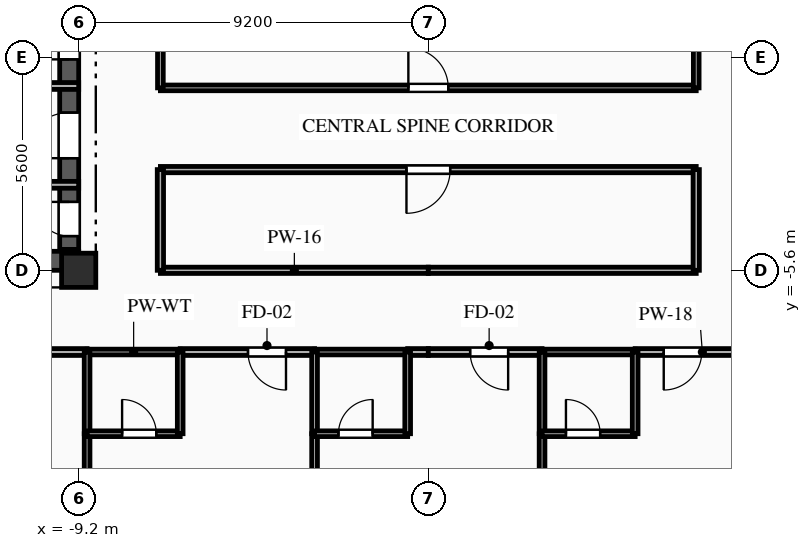
"""IFC4 building model, lengths in metres.
Left out: names, types, materials, properties, quantities, classifications, styles, units other than length and angle.
Written with IfcOpenShell. Run it as: python <this file> out.ifc"""

import sys

from ifc_helpers import new_model, si_unit, direction, frame, frame_2d, origin, origin_2d, place, context, subcontext, project, spatial, rectangle, extrude, element, fill, save


model = new_model("IFC4")
c1 = context("Model", 3, precision=1e-05, world=origin(), true_north=direction((0.0, 1.0)))
c2 = subcontext(c1, "Body", "Model", "MODEL_VIEW")
j1 = project(units=[si_unit("LENGTHUNIT", "METRE"), si_unit("PLANEANGLEUNIT", "RADIAN")], contexts=[c1])
p1 = place(None, origin())
s1 = spatial("IfcSite", under=j1, at=p1, CompositionType="ELEMENT")
p2 = place(p1, origin())
s2 = spatial("IfcBuilding", under=s1, at=p2, CompositionType="ELEMENT")
p3 = place(p2, frame((0.0, 0.0, 154.45)))
s3 = spatial("IfcBuildingStorey", under=s2, at=p3, CompositionType="ELEMENT", Elevation=154.45)
p4 = place(p3, frame((-9.2, -5.6, 0.0), z_axis=(0.0, 0.0, 1.0), x_axis=(1.0, 0.0, 0.0)))
e1 = element("IfcColumn", 1, at=p4, inside=s3, PredefinedType="COLUMN", context=c2, shape_type="SweptSolid", body=[
    extrude(rectangle(XDim=0.9, YDim=0.9, at=origin_2d()), origin(), (0.0, 0.0, 1.0), 3.35),
])
p5 = place(p3, frame((-18.8, -5.35, 0.0), z_axis=(0.0, 0.0, 1.0), x_axis=(1.0, 0.0, 0.0)))
e2 = element("IfcWall", 2, at=p5, inside=s3, PredefinedType="SHEAR", context=c2, shape_type="SweptSolid", body=[
    extrude(rectangle(XDim=9.6, YDim=0.5, at=frame_2d((4.8, 0.0))), origin(), (0.0, 0.0, 1.0), 3.04),
])
p6 = place(p5, frame((1.05, 0.0, 0.0)))
e3 = element("IfcOpeningElement", 3, at=p6, cuts=e2, PredefinedType="OPENING", context=c2, shape_type="SweptSolid", body=[
    extrude(rectangle(XDim=0.9, YDim=2.1, at=frame_2d((0.45, 1.05))), frame((0.0, 0.26, 0.0), z_axis=(0.0, -1.0, 0.0), x_axis=(1.0, 0.0, 0.0)), (0.0, 0.0, 1.0), 0.52),
])
p7 = place(p3, frame((-9.45, -5.05, 0.0), z_axis=(0.0, 0.0, 1.0), x_axis=(0.0, 1.0, 0.0)))
e4 = element("IfcWall", 4, at=p7, inside=s3, PredefinedType="SHEAR", context=c2, shape_type="SweptSolid", body=[
    extrude(rectangle(XDim=10.1, YDim=0.5, at=frame_2d((5.05, 0.0))), origin(), (0.0, 0.0, 1.0), 3.04),
])
p8 = place(p7, frame((7.15, 0.0, 0.0)))
e5 = element("IfcOpeningElement", 5, at=p8, cuts=e4, PredefinedType="OPENING", context=c2, shape_type="SweptSolid", body=[
    extrude(rectangle(XDim=0.9, YDim=2.1, at=frame_2d((0.45, 1.05))), frame((0.0, 0.26, 0.0), z_axis=(0.0, -1.0, 0.0), x_axis=(1.0, 0.0, 0.0)), (0.0, 0.0, 1.0), 0.52),
])
p9 = place(p7, frame((2.4, 0.0, 0.0)))
e6 = element("IfcOpeningElement", 6, at=p9, cuts=e4, PredefinedType="OPENING", context=c2, shape_type="SweptSolid", body=[
    extrude(rectangle(XDim=1.2, YDim=2.15, at=frame_2d((0.6, 1.075))), frame((0.0, 0.26, 0.0), z_axis=(0.0, -1.0, 0.0), x_axis=(1.0, 0.0, 0.0)), (0.0, 0.0, 1.0), 0.52),
])
p10 = place(p7, frame((0.35, 0.0, 0.0)))
e7 = element("IfcOpeningElement", 7, at=p10, cuts=e4, PredefinedType="OPENING", context=c2, shape_type="SweptSolid", body=[
    extrude(rectangle(XDim=0.9, YDim=2.1, at=frame_2d((0.45, 1.05))), frame((0.0, 0.26, 0.0), z_axis=(0.0, -1.0, 0.0), x_axis=(1.0, 0.0, 0.0)), (0.0, 0.0, 1.0), 0.52),
])
p11 = place(p7, frame((5.0, 0.0, 0.0)))
e8 = element("IfcOpeningElement", 8, at=p11, cuts=e4, PredefinedType="OPENING", context=c2, shape_type="SweptSolid", body=[
    extrude(rectangle(XDim=0.9, YDim=2.1, at=frame_2d((0.45, 1.05))), frame((0.0, 0.26, 0.0), z_axis=(0.0, -1.0, 0.0), x_axis=(1.0, 0.0, 0.0)), (0.0, 0.0, 1.0), 0.52),
])
p12 = place(p3, frame((-15.05, -3.35, 0.0), z_axis=(0.0, 0.0, 1.0), x_axis=(1.0, 0.0, 0.0)))
e9 = element("IfcWall", 9, at=p12, inside=s3, PredefinedType="PARTITIONING", context=c2, shape_type="SweptSolid", body=[
    extrude(rectangle(XDim=5.85, YDim=0.18, at=frame_2d((2.925, 0.0))), origin(), (0.0, 0.0, 1.0), 2.755),
])
p13 = place(p3, frame((-9.2, -0.75, 0.0), z_axis=(0.0, 0.0, 1.0), x_axis=(-1.0, 0.0, 0.0)))
e10 = element("IfcWall", 10, at=p13, inside=s3, PredefinedType="PARTITIONING", context=c2, shape_type="SweptSolid", body=[
    extrude(rectangle(XDim=5.85, YDim=0.18, at=frame_2d((2.925, 0.0))), origin(), (0.0, 0.0, 1.0), 3.04),
])
p14 = place(p3, frame((-8.979, -7.75, 0.0), z_axis=(0.0, 0.0, 1.0), x_axis=(-1.0, 0.0, 0.0)))
e11 = element("IfcWall", 11, at=p14, inside=s3, PredefinedType="PARTITIONING", context=c2, shape_type="SweptSolid", body=[
    extrude(rectangle(XDim=3.535, YDim=0.18, at=frame_2d((1.768, 0.0))), origin(), (0.0, 0.0, 1.0), 3.04),
])
p15 = place(p14, frame((1.783, 0.0, 0.0)))
e12 = element("IfcOpeningElement", 12, at=p15, cuts=e11, PredefinedType="OPENING", context=c2, shape_type="SweptSolid", body=[
    extrude(rectangle(XDim=1.0, YDim=2.15, at=frame_2d((0.5, 1.075))), frame((0.0, 0.1, 0.0), z_axis=(0.0, -1.0, 0.0), x_axis=(1.0, 0.0, 0.0)), (0.0, 0.0, 1.0), 0.2),
])
p16 = place(p3, frame((-2.993, -7.75, 0.0), z_axis=(0.0, 0.0, 1.0), x_axis=(-1.0, 0.0, 0.0)))
e13 = element("IfcWall", 13, at=p16, inside=s3, PredefinedType="PARTITIONING", context=c2, shape_type="SweptSolid", body=[
    extrude(rectangle(XDim=3.536, YDim=0.18, at=frame_2d((1.768, 0.0))), origin(), (0.0, 0.0, 1.0), 3.04),
])
p17 = place(p16, frame((0.752, 0.0, 0.0)))
e14 = element("IfcOpeningElement", 14, at=p17, cuts=e13, PredefinedType="OPENING", context=c2, shape_type="SweptSolid", body=[
    extrude(rectangle(XDim=1.0, YDim=2.15, at=frame_2d((0.5, 1.075))), frame((0.0, 0.1, 0.0), z_axis=(0.0, -1.0, 0.0), x_axis=(1.0, 0.0, 0.0)), (0.0, 0.0, 1.0), 0.2),
])
p18 = place(p3, frame((-6.529, -7.75, 0.0), z_axis=(0.0, 0.0, 1.0), x_axis=(-1.0, 0.0, 0.0)))
e15 = element("IfcWall", 15, at=p18, inside=s3, PredefinedType="PLUMBINGWALL", context=c2, shape_type="SweptSolid", body=[
    extrude(rectangle(XDim=2.45, YDim=0.15, at=frame_2d((1.225, 0.0))), origin(), (0.0, 0.0, 1.0), 3.04),
])
p19 = place(p3, frame((0.0, -7.75, 0.0), z_axis=(0.0, 0.0, 1.0), x_axis=(-1.0, 0.0, 0.0)))
e16 = element("IfcWall", 16, at=p19, inside=s3, PredefinedType="PARTITIONING", context=c2, shape_type="SweptSolid", body=[
    extrude(rectangle(XDim=0.543, YDim=0.18, at=frame_2d((0.271, 0.0))), origin(), (0.0, 0.0, 1.0), 3.04),
])
p20 = place(p3, frame((-0.543, -7.75, 0.0), z_axis=(0.0, 0.0, 1.0), x_axis=(-1.0, 0.0, 0.0)))
e17 = element("IfcWall", 17, at=p20, inside=s3, PredefinedType="PLUMBINGWALL", context=c2, shape_type="SweptSolid", body=[
    extrude(rectangle(XDim=2.45, YDim=0.15, at=frame_2d((1.225, 0.0))), origin(), (0.0, 0.0, 1.0), 3.04),
])
p21 = place(p3, frame((-7.05, -5.6, 0.0), z_axis=(0.0, 0.0, 1.0), x_axis=(1.0, 0.0, 0.0)))
e18 = element("IfcWall", 18, at=p21, inside=s3, PredefinedType="PARTITIONING", context=c2, shape_type="SweptSolid", body=[
    extrude(rectangle(XDim=7.05, YDim=0.165, at=frame_2d((3.525, 0.0))), origin(), (0.0, 0.0, 1.0), 2.525),
])
p22 = place(p3, frame((2.993, -7.75, 0.0), z_axis=(0.0, 0.0, 1.0), x_axis=(-1.0, 0.0, 0.0)))
e19 = element("IfcWall", 19, at=p22, inside=s3, PredefinedType="PARTITIONING", context=c2, shape_type="SweptSolid", body=[
    extrude(rectangle(XDim=2.993, YDim=0.18, at=frame_2d((1.497, 0.0))), origin(), (0.0, 0.0, 1.0), 3.04),
])
p23 = place(p22, frame((0.892, 0.0, 0.0)))
e20 = element("IfcOpeningElement", 20, at=p23, cuts=e19, PredefinedType="OPENING", context=c2, shape_type="SweptSolid", body=[
    extrude(rectangle(XDim=1.0, YDim=2.15, at=frame_2d((0.5, 1.075))), frame((0.0, 0.1, 0.0), z_axis=(0.0, -1.0, 0.0), x_axis=(1.0, 0.0, 0.0)), (0.0, 0.0, 1.0), 0.2),
])
p24 = place(p3, frame((8.979, -7.75, 0.0), z_axis=(0.0, 0.0, 1.0), x_axis=(-1.0, 0.0, 0.0)))
e21 = element("IfcWall", 21, at=p24, inside=s3, PredefinedType="PARTITIONING", context=c2, shape_type="SweptSolid", body=[
    extrude(rectangle(XDim=3.536, YDim=0.18, at=frame_2d((1.768, 0.0))), origin(), (0.0, 0.0, 1.0), 3.04),
])
p25 = place(p24, frame((1.784, 0.0, 0.0)))
e22 = element("IfcOpeningElement", 22, at=p25, cuts=e21, PredefinedType="OPENING", context=c2, shape_type="SweptSolid", body=[
    extrude(rectangle(XDim=1.0, YDim=2.15, at=frame_2d((0.5, 1.075))), frame((0.0, 0.1, 0.0), z_axis=(0.0, -1.0, 0.0), x_axis=(1.0, 0.0, 0.0)), (0.0, 0.0, 1.0), 0.2),
])
p26 = place(p3, frame((5.443, -7.75, 0.0), z_axis=(0.0, 0.0, 1.0), x_axis=(-1.0, 0.0, 0.0)))
e23 = element("IfcWall", 23, at=p26, inside=s3, PredefinedType="PLUMBINGWALL", context=c2, shape_type="SweptSolid", body=[
    extrude(rectangle(XDim=2.45, YDim=0.15, at=frame_2d((1.225, 0.0))), origin(), (0.0, 0.0, 1.0), 3.04),
])
p27 = place(p3, frame((0.0, -5.6, 0.0), z_axis=(0.0, 0.0, 1.0), x_axis=(1.0, 0.0, 0.0)))
e24 = element("IfcWall", 24, at=p27, inside=s3, PredefinedType="PARTITIONING", context=c2, shape_type="SweptSolid", body=[
    extrude(rectangle(XDim=7.05, YDim=0.165, at=frame_2d((3.525, 0.0))), origin(), (0.0, 0.0, 1.0), 2.525),
])
p28 = place(p3, frame((-7.05, -0.8, 0.0), z_axis=(0.0, 0.0, 1.0), x_axis=(1.0, 0.0, 0.0)))
e25 = element("IfcWall", 25, at=p28, inside=s3, PredefinedType="PARTITIONING", context=c2, shape_type="SweptSolid", body=[
    extrude(rectangle(XDim=14.1, YDim=0.15, at=frame_2d((7.05, 0.0))), origin(), (0.0, 0.0, 1.0), 3.04),
])
p29 = place(p28, frame((6.525, 0.0, 0.0)))
e26 = element("IfcOpeningElement", 26, at=p29, cuts=e25, PredefinedType="OPENING", context=c2, shape_type="SweptSolid", body=[
    extrude(rectangle(XDim=1.05, YDim=2.15, at=frame_2d((0.525, 1.075))), frame((0.0, 0.085, 0.0), z_axis=(0.0, -1.0, 0.0), x_axis=(1.0, 0.0, 0.0)), (0.0, 0.0, 1.0), 0.17),
])
p30 = place(p3, frame((7.05, -2.95, 0.0), z_axis=(0.0, 0.0, 1.0), x_axis=(-1.0, 0.0, 0.0)))
e27 = element("IfcWall", 27, at=p30, inside=s3, PredefinedType="PARTITIONING", context=c2, shape_type="SweptSolid", body=[
    extrude(rectangle(XDim=14.1, YDim=0.165, at=frame_2d((7.05, 0.0))), origin(), (0.0, 0.0, 1.0), 3.04),
])
p31 = place(p30, frame((6.475, 0.0, 0.0)))
e28 = element("IfcOpeningElement", 28, at=p31, cuts=e27, PredefinedType="OPENING", context=c2, shape_type="SweptSolid", body=[
    extrude(rectangle(XDim=1.15, YDim=2.15, at=frame_2d((0.575, 1.075))), frame((0.0, 0.093, 0.0), z_axis=(0.0, -1.0, 0.0), x_axis=(1.0, 0.0, 0.0)), (0.0, 0.0, 1.0), 0.185),
])
p32 = place(p3, frame((-7.05, 8.5, 0.0), z_axis=(0.0, 0.0, 1.0), x_axis=(0.0, -1.0, 0.0)))
e29 = element("IfcWall", 29, at=p32, inside=s3, PredefinedType="PARTITIONING", context=c2, shape_type="SweptSolid", body=[
    extrude(rectangle(XDim=9.3, YDim=0.15, at=frame_2d((4.65, 0.0))), origin(), (0.0, 0.0, 1.0), 3.04),
])
p33 = place(p3, frame((-7.05, -2.95, 0.0), z_axis=(0.0, 0.0, 1.0), x_axis=(0.0, -1.0, 0.0)))
e30 = element("IfcWall", 30, at=p33, inside=s3, PredefinedType="PARTITIONING", context=c2, shape_type="SweptSolid", body=[
    extrude(rectangle(XDim=2.65, YDim=0.165, at=frame_2d((1.325, 0.0))), origin(), (0.0, 0.0, 1.0), 3.04),
])
p34 = place(p3, frame((7.05, -0.8, 0.0), z_axis=(0.0, 0.0, 1.0), x_axis=(0.0, 1.0, 0.0)))
e31 = element("IfcWall", 31, at=p34, inside=s3, PredefinedType="PARTITIONING", context=c2, shape_type="SweptSolid", body=[
    extrude(rectangle(XDim=9.3, YDim=0.15, at=frame_2d((4.65, 0.0))), origin(), (0.0, 0.0, 1.0), 3.04),
])
p35 = place(p3, frame((7.05, -5.6, 0.0), z_axis=(0.0, 0.0, 1.0), x_axis=(0.0, 1.0, 0.0)))
e32 = element("IfcWall", 32, at=p35, inside=s3, PredefinedType="PARTITIONING", context=c2, shape_type="SweptSolid", body=[
    extrude(rectangle(XDim=2.65, YDim=0.165, at=frame_2d((1.325, 0.0))), origin(), (0.0, 0.0, 1.0), 3.04),
])
p36 = place(p3, frame((-8.979, -9.9, 0.0), z_axis=(0.0, 0.0, 1.0), x_axis=(0.0, -1.0, 0.0)))
e33 = element("IfcWall", 33, at=p36, inside=s3, PredefinedType="PARTITIONING", context=c2, shape_type="SweptSolid", body=[
    extrude(rectangle(XDim=5.7, YDim=0.15, at=frame_2d((2.85, 0.0))), origin(), (0.0, 0.0, 1.0), 2.525),
])
p37 = place(p3, frame((-8.979, -7.75, 0.0), z_axis=(0.0, 0.0, 1.0), x_axis=(0.0, -1.0, 0.0)))
e34 = element("IfcWall", 34, at=p37, inside=s3, PredefinedType="PLUMBINGWALL", context=c2, shape_type="SweptSolid", body=[
    extrude(rectangle(XDim=2.15, YDim=0.15, at=frame_2d((1.075, 0.0))), origin(), (0.0, 0.0, 1.0), 2.525),
])
p38 = place(p3, frame((-8.979, -9.9, 0.0), z_axis=(0.0, 0.0, 1.0), x_axis=(1.0, 0.0, 0.0)))
e35 = element("IfcWall", 35, at=p38, inside=s3, PredefinedType="PLUMBINGWALL", context=c2, shape_type="SweptSolid", body=[
    extrude(rectangle(XDim=2.45, YDim=0.15, at=frame_2d((1.225, 0.0))), origin(), (0.0, 0.0, 1.0), 3.04),
])
p39 = place(p38, frame((0.921, 0.0, 0.0)))
e36 = element("IfcOpeningElement", 36, at=p39, cuts=e35, PredefinedType="OPENING", context=c2, shape_type="SweptSolid", body=[
    extrude(rectangle(XDim=0.9, YDim=2.1, at=frame_2d((0.45, 1.05))), frame((0.0, 0.085, 0.0), z_axis=(0.0, -1.0, 0.0), x_axis=(1.0, 0.0, 0.0)), (0.0, 0.0, 1.0), 0.17),
])
p40 = place(p3, frame((-6.529, -9.9, 0.0), z_axis=(0.0, 0.0, 1.0), x_axis=(0.0, 1.0, 0.0)))
e37 = element("IfcWall", 37, at=p40, inside=s3, PredefinedType="PLUMBINGWALL", context=c2, shape_type="SweptSolid", body=[
    extrude(rectangle(XDim=2.15, YDim=0.15, at=frame_2d((1.075, 0.0))), origin(), (0.0, 0.0, 1.0), 3.04),
])
p41 = place(p3, frame((-2.993, -9.9, 0.0), z_axis=(0.0, 0.0, 1.0), x_axis=(0.0, -1.0, 0.0)))
e38 = element("IfcWall", 38, at=p41, inside=s3, PredefinedType="PARTITIONING", context=c2, shape_type="SweptSolid", body=[
    extrude(rectangle(XDim=5.7, YDim=0.15, at=frame_2d((2.85, 0.0))), origin(), (0.0, 0.0, 1.0), 3.04),
])
p42 = place(p3, frame((-2.993, -7.75, 0.0), z_axis=(0.0, 0.0, 1.0), x_axis=(0.0, -1.0, 0.0)))
e39 = element("IfcWall", 39, at=p42, inside=s3, PredefinedType="PLUMBINGWALL", context=c2, shape_type="SweptSolid", body=[
    extrude(rectangle(XDim=2.15, YDim=0.15, at=frame_2d((1.075, 0.0))), origin(), (0.0, 0.0, 1.0), 3.04),
])
p43 = place(p3, frame((-2.993, -9.9, 0.0), z_axis=(0.0, 0.0, 1.0), x_axis=(1.0, 0.0, 0.0)))
e40 = element("IfcWall", 40, at=p43, inside=s3, PredefinedType="PLUMBINGWALL", context=c2, shape_type="SweptSolid", body=[
    extrude(rectangle(XDim=2.45, YDim=0.15, at=frame_2d((1.225, 0.0))), origin(), (0.0, 0.0, 1.0), 3.04),
])
p44 = place(p43, frame((0.629, 0.0, 0.0)))
e41 = element("IfcOpeningElement", 41, at=p44, cuts=e40, PredefinedType="OPENING", context=c2, shape_type="SweptSolid", body=[
    extrude(rectangle(XDim=0.9, YDim=2.1, at=frame_2d((0.45, 1.05))), frame((0.0, 0.085, 0.0), z_axis=(0.0, -1.0, 0.0), x_axis=(1.0, 0.0, 0.0)), (0.0, 0.0, 1.0), 0.17),
])
p45 = place(p3, frame((-0.543, -9.9, 0.0), z_axis=(0.0, 0.0, 1.0), x_axis=(0.0, 1.0, 0.0)))
e42 = element("IfcWall", 42, at=p45, inside=s3, PredefinedType="PLUMBINGWALL", context=c2, shape_type="SweptSolid", body=[
    extrude(rectangle(XDim=2.15, YDim=0.15, at=frame_2d((1.075, 0.0))), origin(), (0.0, 0.0, 1.0), 3.04),
])
p46 = place(p3, frame((2.993, -9.9, 0.0), z_axis=(0.0, 0.0, 1.0), x_axis=(0.0, -1.0, 0.0)))
e43 = element("IfcWall", 43, at=p46, inside=s3, PredefinedType="PARTITIONING", context=c2, shape_type="SweptSolid", body=[
    extrude(rectangle(XDim=5.7, YDim=0.15, at=frame_2d((2.85, 0.0))), origin(), (0.0, 0.0, 1.0), 3.04),
])
p47 = place(p3, frame((2.993, -7.75, 0.0), z_axis=(0.0, 0.0, 1.0), x_axis=(0.0, -1.0, 0.0)))
e44 = element("IfcWall", 44, at=p47, inside=s3, PredefinedType="PLUMBINGWALL", context=c2, shape_type="SweptSolid", body=[
    extrude(rectangle(XDim=2.15, YDim=0.15, at=frame_2d((1.075, 0.0))), origin(), (0.0, 0.0, 1.0), 3.04),
])
p48 = place(p3, frame((2.993, -9.9, 0.0), z_axis=(0.0, 0.0, 1.0), x_axis=(1.0, 0.0, 0.0)))
e45 = element("IfcWall", 45, at=p48, inside=s3, PredefinedType="PLUMBINGWALL", context=c2, shape_type="SweptSolid", body=[
    extrude(rectangle(XDim=2.45, YDim=0.15, at=frame_2d((1.225, 0.0))), origin(), (0.0, 0.0, 1.0), 3.04),
])
p49 = place(p48, frame((0.629, 0.0, 0.0)))
e46 = element("IfcOpeningElement", 46, at=p49, cuts=e45, PredefinedType="OPENING", context=c2, shape_type="SweptSolid", body=[
    extrude(rectangle(XDim=0.9, YDim=2.1, at=frame_2d((0.45, 1.05))), frame((0.0, 0.085, 0.0), z_axis=(0.0, -1.0, 0.0), x_axis=(1.0, 0.0, 0.0)), (0.0, 0.0, 1.0), 0.17),
])
p50 = place(p3, frame((5.443, -9.9, 0.0), z_axis=(0.0, 0.0, 1.0), x_axis=(0.0, 1.0, 0.0)))
e47 = element("IfcWall", 47, at=p50, inside=s3, PredefinedType="PLUMBINGWALL", context=c2, shape_type="SweptSolid", body=[
    extrude(rectangle(XDim=2.15, YDim=0.15, at=frame_2d((1.075, 0.0))), origin(), (0.0, 0.0, 1.0), 3.04),
])
p51 = place(p9, origin())
e48 = element("IfcDoor", 48, at=p51, inside=s3, OperationType="SINGLE_SWING_LEFT", PredefinedType="DOOR", context=c2, shape_type="SweptSolid", body=[
    extrude(rectangle(XDim=1.2, YDim=2.15, at=frame_2d((0.6, 1.075))), frame((0.0, 0.025, 0.0), z_axis=(0.0, -1.0, 0.0), x_axis=(1.0, 0.0, 0.0)), (0.0, 0.0, 1.0), 0.05),
])
fill(e6, e48)
p52 = place(p10, origin())
e49 = element("IfcDoor", 49, at=p52, inside=s3, OperationType="SINGLE_SWING_RIGHT", PredefinedType="DOOR", context=c2, shape_type="SweptSolid", body=[
    extrude(rectangle(XDim=0.9, YDim=2.1, at=frame_2d((0.45, 1.05))), frame((0.0, 0.025, 0.0), z_axis=(0.0, -1.0, 0.0), x_axis=(1.0, 0.0, 0.0)), (0.0, 0.0, 1.0), 0.05),
])
fill(e7, e49)
p53 = place(p11, origin())
e50 = element("IfcDoor", 50, at=p53, inside=s3, OperationType="SINGLE_SWING_LEFT", PredefinedType="DOOR", context=c2, shape_type="SweptSolid", body=[
    extrude(rectangle(XDim=0.9, YDim=2.1, at=frame_2d((0.45, 1.05))), frame((0.0, 0.025, 0.0), z_axis=(0.0, -1.0, 0.0), x_axis=(1.0, 0.0, 0.0)), (0.0, 0.0, 1.0), 0.05),
])
fill(e8, e50)
p54 = place(p17, origin())
e51 = element("IfcDoor", 51, at=p54, inside=s3, OperationType="SINGLE_SWING_LEFT", PredefinedType="DOOR", context=c2, shape_type="SweptSolid", body=[
    extrude(rectangle(XDim=1.0, YDim=2.15, at=frame_2d((0.5, 1.075))), frame((0.0, 0.025, 0.0), z_axis=(0.0, -1.0, 0.0), x_axis=(1.0, 0.0, 0.0)), (0.0, 0.0, 1.0), 0.05),
])
fill(e14, e51)
p55 = place(p23, origin())
e52 = element("IfcDoor", 52, at=p55, inside=s3, OperationType="SINGLE_SWING_LEFT", PredefinedType="DOOR", context=c2, shape_type="SweptSolid", body=[
    extrude(rectangle(XDim=1.0, YDim=2.15, at=frame_2d((0.5, 1.075))), frame((0.0, 0.025, 0.0), z_axis=(0.0, -1.0, 0.0), x_axis=(1.0, 0.0, 0.0)), (0.0, 0.0, 1.0), 0.05),
])
fill(e20, e52)
p56 = place(p25, origin())
e53 = element("IfcDoor", 53, at=p56, inside=s3, OperationType="SINGLE_SWING_RIGHT", PredefinedType="DOOR", context=c2, shape_type="SweptSolid", body=[
    extrude(rectangle(XDim=1.0, YDim=2.15, at=frame_2d((0.5, 1.075))), frame((0.0, 0.025, 0.0), z_axis=(0.0, -1.0, 0.0), x_axis=(1.0, 0.0, 0.0)), (0.0, 0.0, 1.0), 0.05),
])
fill(e22, e53)
p57 = place(p29, origin())
e54 = element("IfcDoor", 54, at=p57, inside=s3, OperationType="SINGLE_SWING_LEFT", PredefinedType="DOOR", context=c2, shape_type="SweptSolid", body=[
    extrude(rectangle(XDim=1.05, YDim=2.15, at=frame_2d((0.525, 1.075))), frame((0.0, 0.025, 0.0), z_axis=(0.0, -1.0, 0.0), x_axis=(1.0, 0.0, 0.0)), (0.0, 0.0, 1.0), 0.05),
])
fill(e26, e54)
p58 = place(p31, origin())
e55 = element("IfcDoor", 55, at=p58, inside=s3, OperationType="SINGLE_SWING_RIGHT", PredefinedType="DOOR", context=c2, shape_type="SweptSolid", body=[
    extrude(rectangle(XDim=1.15, YDim=2.15, at=frame_2d((0.575, 1.075))), frame((0.0, 0.025, 0.0), z_axis=(0.0, -1.0, 0.0), x_axis=(1.0, 0.0, 0.0)), (0.0, 0.0, 1.0), 0.05),
])
fill(e28, e55)
p59 = place(p39, origin())
e56 = element("IfcDoor", 56, at=p59, inside=s3, OperationType="SINGLE_SWING_LEFT", PredefinedType="DOOR", context=c2, shape_type="SweptSolid", body=[
    extrude(rectangle(XDim=0.9, YDim=2.1, at=frame_2d((0.45, 1.05))), frame((0.0, 0.025, 0.0), z_axis=(0.0, -1.0, 0.0), x_axis=(1.0, 0.0, 0.0)), (0.0, 0.0, 1.0), 0.05),
])
fill(e36, e56)
p60 = place(p44, origin())
e57 = element("IfcDoor", 57, at=p60, inside=s3, OperationType="SINGLE_SWING_RIGHT", PredefinedType="DOOR", context=c2, shape_type="SweptSolid", body=[
    extrude(rectangle(XDim=0.9, YDim=2.1, at=frame_2d((0.45, 1.05))), frame((0.0, 0.025, 0.0), z_axis=(0.0, -1.0, 0.0), x_axis=(1.0, 0.0, 0.0)), (0.0, 0.0, 1.0), 0.05),
])
fill(e41, e57)
p61 = place(p49, origin())
e58 = element("IfcDoor", 58, at=p61, inside=s3, OperationType="SINGLE_SWING_LEFT", PredefinedType="DOOR", context=c2, shape_type="SweptSolid", body=[
    extrude(rectangle(XDim=0.9, YDim=2.1, at=frame_2d((0.45, 1.05))), frame((0.0, 0.025, 0.0), z_axis=(0.0, -1.0, 0.0), x_axis=(1.0, 0.0, 0.0)), (0.0, 0.0, 1.0), 0.05),
])
fill(e46, e58)
save(model, sys.argv[1])
